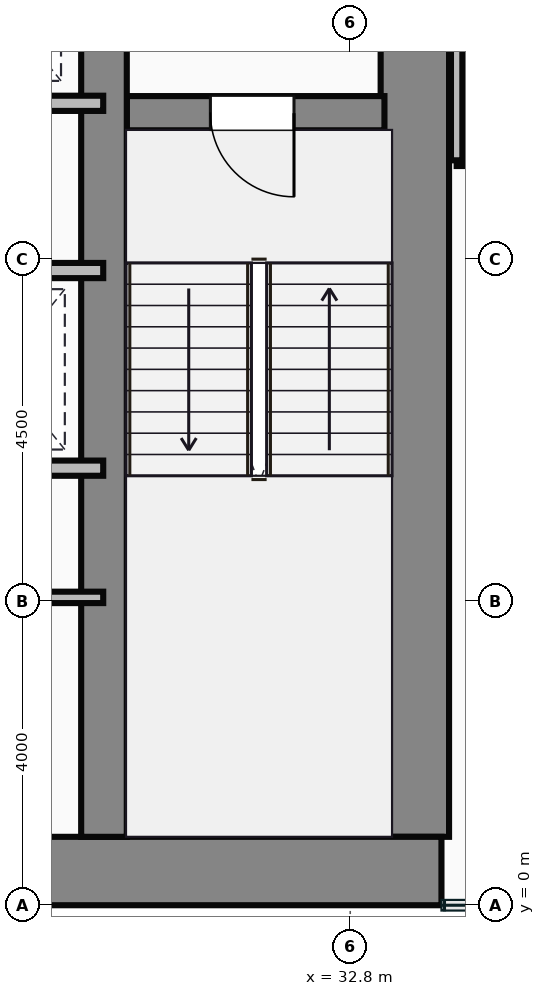
"""IFC4 building model, lengths in metres.
Left out: names, types, materials, properties, quantities, classifications, styles, units other than length and angle.
Written with IfcOpenShell. Run it as: python <this file> out.ifc"""

import sys

from ifc_helpers import new_model, si_unit, direction, frame, frame_2d, origin, place, context, subcontext, project, spatial, rectangle, extrude, source, transform, mapped, element, fill, save


model = new_model("IFC4")
c1 = context("Model", 3, precision=1e-05, world=origin(), true_north=direction((0.0, 1.0)))
c2 = subcontext(c1, "Body", "Model", "MODEL_VIEW")
j1 = project(units=[si_unit("LENGTHUNIT", "METRE"), si_unit("PLANEANGLEUNIT", "RADIAN")], contexts=[c1])
p1 = place(None, origin())
s1 = spatial("IfcSite", under=j1, at=p1, CompositionType="ELEMENT")
p2 = place(p1, origin())
s2 = spatial("IfcBuilding", under=s1, at=p2, CompositionType="ELEMENT")
p3 = place(p2, frame((0.0, 0.0, 69.0)))
s3 = spatial("IfcBuildingStorey", under=s2, at=p3, CompositionType="ELEMENT", Elevation=69.0)
m1 = source(origin(), c2, "Body", "SweptSolid", [
    extrude(rectangle(XDim=29.5, YDim=0.9, at=frame_2d((14.75, 0.0))), origin(), (0.0, 0.0, 1.0), 3.65),
])
p4 = place(p3, frame((4.5, 0.45, 0.0), z_axis=(0.0, 0.0, 1.0), x_axis=(1.0, 0.0, 0.0)))
e1 = element("IfcWall", 1, at=p4, inside=s3, PredefinedType="SHEAR", context=c2, shape_type="MappedRepresentation", body=[
    mapped(m1, transform((0.0, 0.0, 0.0))),
])
m2 = source(origin(), c2, "Body", "SweptSolid", [
    extrude(rectangle(XDim=13.1, YDim=0.9, at=frame_2d((6.55, 0.0))), origin(), (0.0, 0.0, 1.0), 3.65),
])
p5 = place(p3, frame((33.65, 0.9, 0.0), z_axis=(0.0, 0.0, 1.0), x_axis=(0.0, 1.0, 0.0)))
e2 = element("IfcWall", 2, at=p5, inside=s3, PredefinedType="SHEAR", context=c2, shape_type="MappedRepresentation", body=[
    mapped(m2, transform((0.0, 0.0, 0.0))),
])
m3 = source(origin(), c2, "Body", "SweptSolid", [
    extrude(rectangle(XDim=12.2, YDim=0.6, at=frame_2d((6.1, 0.0))), origin(), (0.0, 0.0, 1.0), 3.65),
])
p6 = place(p3, frame((29.56, 0.9, 0.0), z_axis=(0.0, 0.0, 1.0), x_axis=(0.0, 1.0, 0.0)))
e3 = element("IfcWall", 3, at=p6, inside=s3, PredefinedType="SHEAR", context=c2, shape_type="MappedRepresentation", body=[
    mapped(m3, transform((0.0, 0.0, 0.0))),
])
m4 = source(origin(), c2, "Body", "SweptSolid", [
    extrude(rectangle(XDim=3.39, YDim=0.45, at=frame_2d((1.695, 0.0))), origin(), (0.0, 0.0, 1.0), 3.65),
])
p7 = place(p3, frame((29.86, 10.42, 0.0), z_axis=(0.0, 0.0, 1.0), x_axis=(1.0, 0.0, 0.0)))
e4 = element("IfcWall", 4, at=p7, inside=s3, PredefinedType="SHEAR", context=c2, shape_type="MappedRepresentation", body=[
    mapped(m4, transform((0.0, 0.0, 0.0))),
])
p8 = place(p7, frame((1.1, 0.0, 0.0)))
e5 = element("IfcOpeningElement", 5, at=p8, cuts=e4, PredefinedType="OPENING", context=c2, shape_type="SweptSolid", body=[
    extrude(rectangle(XDim=1.1, YDim=2.15, at=frame_2d((0.55, 1.075))), frame((0.0, 0.235, 0.0), z_axis=(0.0, -1.0, 0.0), x_axis=(1.0, 0.0, 0.0)), (0.0, 0.0, 1.0), 0.47),
])
m5 = source(origin(), c2, "Body", "SweptSolid", [
    extrude(rectangle(XDim=8.8, YDim=0.2, at=frame_2d((4.4, 0.0))), origin(), (0.0, 0.0, 1.0), 3.4),
])
p9 = place(p3, frame((20.75, 10.55, 0.0), z_axis=(0.0, 0.0, 1.0), x_axis=(1.0, 0.0, 0.0)))
e6 = element("IfcWall", 6, at=p9, inside=s3, PredefinedType="PARTITIONING", context=c2, shape_type="MappedRepresentation", body=[
    mapped(m5, transform((0.0, 0.0, 0.0))),
])
m6 = source(origin(), c2, "Body", "SweptSolid", [
    extrude(rectangle(XDim=4.55, YDim=0.2, at=frame_2d((2.275, 0.0))), origin(), (0.0, 0.0, 1.0), 3.4),
])
for number, where, z_axis, x_axis in (
    (7, (25.0, 8.35, 0.0), (0.0, 0.0, 1.0), (1.0, 0.0, 0.0)),
    (8, (25.0, 5.75, 0.0), (0.0, 0.0, 1.0), (1.0, 0.0, 0.0)),
):
    element("IfcWall", number, at=place(p3, frame(where, z_axis=z_axis, x_axis=x_axis)), inside=s3, PredefinedType="PARTITIONING", context=c2, shape_type="MappedRepresentation", body=[
        mapped(m6, transform((0.0, 0.0, 0.0))),
    ])
m7 = source(origin(), c2, "Body", "SweptSolid", [
    extrude(rectangle(XDim=4.55, YDim=0.15, at=frame_2d((2.275, 0.0))), origin(), (0.0, 0.0, 1.0), 3.4),
])
p10 = place(p3, frame((25.0, 4.05, 0.0), z_axis=(0.0, 0.0, 1.0), x_axis=(1.0, 0.0, 0.0)))
e9 = element("IfcWall", 9, at=p10, inside=s3, PredefinedType="PARTITIONING", context=c2, shape_type="MappedRepresentation", body=[
    mapped(m7, transform((0.0, 0.0, 0.0))),
])
m8 = source(origin(), c2, "Body", "SweptSolid", [
    extrude(rectangle(XDim=4.8, YDim=0.15, at=frame_2d((2.4, 0.0))), origin(), (0.0, 0.0, 1.0), 3.4),
])
p11 = place(p3, frame((34.2, 9.8, 0.0), z_axis=(0.0, 0.0, 1.0), x_axis=(1.0, 0.0, 0.0)))
e10 = element("IfcWall", 10, at=p11, inside=s3, PredefinedType="PARTITIONING", context=c2, shape_type="MappedRepresentation", body=[
    mapped(m8, transform((0.0, 0.0, 0.0))),
])
m9 = source(origin(), c2, "Body", "SweptSolid", [
    extrude(rectangle(XDim=4.18, YDim=0.15, at=frame_2d((2.09, 0.0))), origin(), (0.0, 0.0, 1.0), 3.4),
])
p12 = place(p3, frame((34.2, 9.8, 0.0), z_axis=(0.0, 0.0, 1.0), x_axis=(0.0, 1.0, 0.0)))
e11 = element("IfcWall", 11, at=p12, inside=s3, PredefinedType="PARTITIONING", context=c2, shape_type="MappedRepresentation", body=[
    mapped(m9, transform((0.0, 0.0, 0.0))),
])
m10 = source(origin(), c2, "Body", "SweptSolid", [
    extrude(rectangle(XDim=1.1, YDim=2.15, at=frame_2d((0.55, 1.075))), frame((0.0, 0.025, 0.0), z_axis=(0.0, -1.0, 0.0), x_axis=(1.0, 0.0, 0.0)), (0.0, 0.0, 1.0), 0.05),
])
p13 = place(p8, frame((1.1, 0.0, 0.0), z_axis=(0.0, 0.0, 1.0), x_axis=(-1.0, 0.0, 0.0)))
e12 = element("IfcDoor", 12, at=p13, inside=s3, OperationType="SINGLE_SWING_RIGHT", PredefinedType="DOOR", context=c2, shape_type="MappedRepresentation", body=[
    mapped(m10, transform((0.0, 0.0, 0.0))),
])
fill(e5, e12)
save(model, sys.argv[1])
